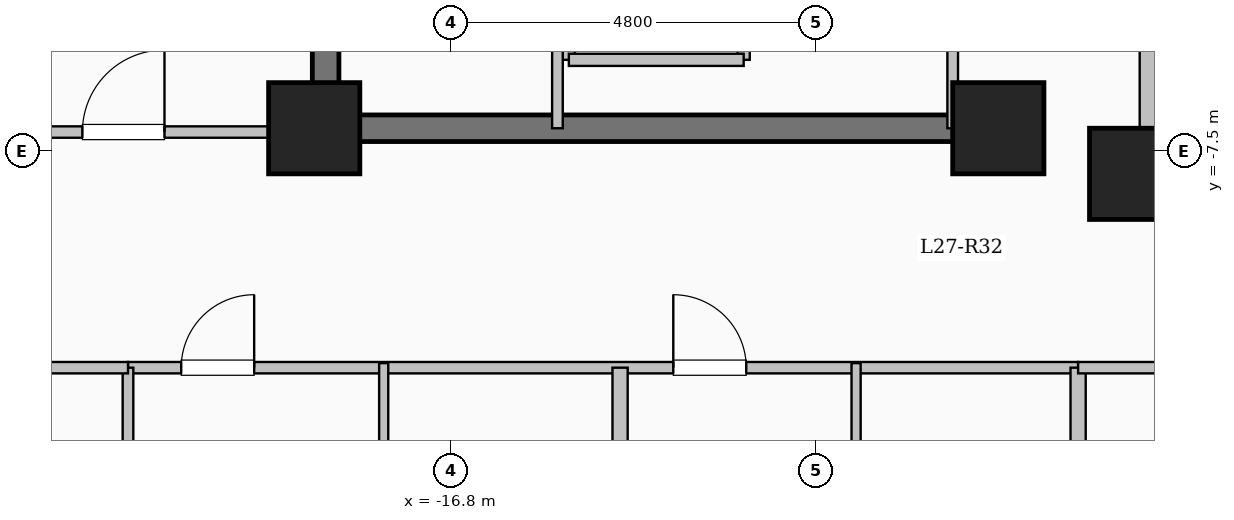
"""IFC4 building model, lengths in metres.
Left out: names, types, materials, properties, quantities, classifications, styles, units other than length and angle.
Written with IfcOpenShell. Run it as: python <this file> out.ifc"""

import sys

from ifc_helpers import new_model, si_unit, direction, frame, frame_2d, origin, origin_2d, place, context, subcontext, project, spatial, rectangle, extrude, element, fill, save


model = new_model("IFC4")
c1 = context("Model", 3, precision=1e-05, world=origin(), true_north=direction((0.0, 1.0)))
c2 = subcontext(c1, "Body", "Model", "MODEL_VIEW")
j1 = project(units=[si_unit("LENGTHUNIT", "METRE"), si_unit("PLANEANGLEUNIT", "RADIAN")], contexts=[c1])
p1 = place(None, origin())
s1 = spatial("IfcSite", under=j1, at=p1, CompositionType="ELEMENT")
p2 = place(p1, origin())
s2 = spatial("IfcBuilding", under=s1, at=p2, CompositionType="ELEMENT")
p3 = place(p2, frame((0.0, 0.0, 101.75)))
s3 = spatial("IfcBuildingStorey", under=s2, at=p3, CompositionType="ELEMENT", Elevation=101.75)
for number, where, z_axis, x_axis in (
    (1, (-7.8, -7.8, 0.0), (0.0, 0.0, 1.0), (1.0, 0.0, 0.0)),
    (2, (-9.6, -7.2, 0.0), (0.0, 0.0, 1.0), (1.0, 0.0, 0.0)),
    (3, (-18.6, -7.2, 0.0), (0.0, 0.0, 1.0), (1.0, 0.0, 0.0)),
):
    element("IfcColumn", number, at=place(p3, frame(where, z_axis=z_axis, x_axis=x_axis)), inside=s3, PredefinedType="COLUMN", context=c2, shape_type="SweptSolid", body=[
        extrude(rectangle(XDim=1.2, YDim=1.2, at=origin_2d()), origin(), (0.0, 0.0, 1.0), 3.35),
    ])
p4 = place(p3, frame((-7.62, -7.62, 0.0), z_axis=(0.0, 0.0, 1.0), x_axis=(1.0, 0.0, 0.0)))
e4 = element("IfcWall", 4, at=p4, inside=s3, PredefinedType="SOLIDWALL", context=c2, shape_type="SweptSolid", body=[
    extrude(rectangle(XDim=15.24, YDim=0.24, at=frame_2d((7.62, 0.0))), origin(), (0.0, 0.0, 1.0), 3.1),
])
p5 = place(p4, frame((6.92, 0.0, 0.95)))
e5 = element("IfcOpeningElement", 5, at=p5, cuts=e4, PredefinedType="OPENING", context=c2, shape_type="SweptSolid", body=[
    extrude(rectangle(XDim=1.4, YDim=1.5, at=frame_2d((0.7, 0.75))), frame((0.0, 0.13, 0.0), z_axis=(0.0, -1.0, 0.0), x_axis=(1.0, 0.0, 0.0)), (0.0, 0.0, 1.0), 0.26),
])
p6 = place(p3, frame((-7.62, 7.62, 0.0), z_axis=(0.0, 0.0, 1.0), x_axis=(0.0, -1.0, 0.0)))
e6 = element("IfcWall", 6, at=p6, inside=s3, PredefinedType="SOLIDWALL", context=c2, shape_type="SweptSolid", body=[
    extrude(rectangle(XDim=15.24, YDim=0.24, at=frame_2d((7.62, 0.0))), origin(), (0.0, 0.0, 1.0), 3.1),
])
p7 = place(p6, frame((6.92, 0.0, 0.95)))
e7 = element("IfcOpeningElement", 7, at=p7, cuts=e6, PredefinedType="OPENING", context=c2, shape_type="SweptSolid", body=[
    extrude(rectangle(XDim=1.4, YDim=1.5, at=frame_2d((0.7, 0.75))), frame((0.0, 0.13, 0.0), z_axis=(0.0, -1.0, 0.0), x_axis=(1.0, 0.0, 0.0)), (0.0, 0.0, 1.0), 0.26),
])
for number, where, z_axis, x_axis in (
    (8, (-15.25, -6.3, 0.0), (0.0, 0.0, 1.0), (0.0, 1.0, 0.0)),
    (9, (-12.95, -6.3, 0.0), (0.0, 0.0, 1.0), (0.0, 1.0, 0.0)),
):
    element("IfcWall", number, at=place(p3, frame(where, z_axis=z_axis, x_axis=x_axis)), inside=s3, PredefinedType="SOLIDWALL", context=c2, shape_type="SweptSolid", body=[
        extrude(rectangle(XDim=2.6, YDim=0.16, at=frame_2d((1.3, 0.0))), origin(), (0.0, 0.0, 1.0), 3.1),
    ])
p8 = place(p3, frame((-15.25, -6.3, 0.0), z_axis=(0.0, 0.0, 1.0), x_axis=(1.0, 0.0, 0.0)))
e10 = element("IfcWall", 10, at=p8, inside=s3, PredefinedType="SOLIDWALL", context=c2, shape_type="SweptSolid", body=[
    extrude(rectangle(XDim=2.3, YDim=0.16, at=frame_2d((1.15, 0.0))), origin(), (0.0, 0.0, 1.0), 3.1),
])
p9 = place(p3, frame((-18.45, -7.375, 0.0), z_axis=(0.0, 0.0, 1.0), x_axis=(0.0, 1.0, 0.0)))
e11 = element("IfcWall", 11, at=p9, inside=s3, PredefinedType="SHEAR", context=c2, shape_type="SweptSolid", body=[
    extrude(rectangle(XDim=14.05, YDim=0.35, at=frame_2d((7.025, 0.0))), origin(), (0.0, 0.0, 1.0), 3.35),
])
p10 = place(p3, frame((-18.625, -7.2, 0.0), z_axis=(0.0, 0.0, 1.0), x_axis=(1.0, 0.0, 0.0)))
e12 = element("IfcWall", 12, at=p10, inside=s3, PredefinedType="SHEAR", context=c2, shape_type="SweptSolid", body=[
    extrude(rectangle(XDim=8.55, YDim=0.35, at=frame_2d((4.275, 0.0))), origin(), (0.0, 0.0, 1.0), 3.35),
])
p11 = place(p3, frame((-15.4, -7.2, 0.0), z_axis=(0.0, 0.0, 1.0), x_axis=(0.0, 1.0, 0.0)))
e13 = element("IfcWall", 13, at=p11, inside=s3, PredefinedType="PARTITIONING", context=c2, shape_type="SweptSolid", body=[
    extrude(rectangle(XDim=10.45, YDim=0.14, at=frame_2d((5.225, 0.0))), origin(), (0.0, 0.0, 1.0), 3.1),
])
p12 = place(p11, frame((9.25, 0.0, 0.0)))
e14 = element("IfcOpeningElement", 14, at=p12, cuts=e13, PredefinedType="OPENING", context=c2, shape_type="SweptSolid", body=[
    extrude(rectangle(XDim=0.9, YDim=2.08, at=frame_2d((0.45, 1.04))), frame((0.0, 0.08, 0.0), z_axis=(0.0, -1.0, 0.0), x_axis=(1.0, 0.0, 0.0)), (0.0, 0.0, 1.0), 0.16),
])
p13 = place(p3, frame((-10.2, -7.2, 0.0), z_axis=(0.0, 0.0, 1.0), x_axis=(0.0, 1.0, 0.0)))
e15 = element("IfcWall", 15, at=p13, inside=s3, PredefinedType="PARTITIONING", context=c2, shape_type="SweptSolid", body=[
    extrude(rectangle(XDim=9.12, YDim=0.14, at=frame_2d((4.56, 0.0))), origin(), (0.0, 0.0, 1.0), 3.1),
])
p14 = place(p13, frame((1.9, 0.0, 0.0)))
e16 = element("IfcOpeningElement", 16, at=p14, cuts=e15, PredefinedType="OPENING", context=c2, shape_type="SweptSolid", body=[
    extrude(rectangle(XDim=0.95, YDim=2.12, at=frame_2d((0.475, 1.06))), frame((0.0, 0.08, 0.0), z_axis=(0.0, -1.0, 0.0), x_axis=(1.0, 0.0, 0.0)), (0.0, 0.0, 1.0), 0.16),
])
p15 = place(p13, frame((7.75, 0.0, 0.0)))
e17 = element("IfcOpeningElement", 17, at=p15, cuts=e15, PredefinedType="OPENING", context=c2, shape_type="SweptSolid", body=[
    extrude(rectangle(XDim=0.95, YDim=2.12, at=frame_2d((0.475, 1.06))), frame((0.0, 0.08, 0.0), z_axis=(0.0, -1.0, 0.0), x_axis=(1.0, 0.0, 0.0)), (0.0, 0.0, 1.0), 0.16),
])
p16 = place(p3, frame((-21.05, -10.35, 0.0), z_axis=(0.0, 0.0, 1.0), x_axis=(1.0, 0.0, 0.0)))
e18 = element("IfcWall", 18, at=p16, inside=s3, PredefinedType="PARTITIONING", context=c2, shape_type="SweptSolid", body=[
    extrude(rectangle(XDim=12.5, YDim=0.15, at=frame_2d((6.25, 0.0))), origin(), (0.0, 0.0, 1.0), 3.1),
])
p17 = place(p16, frame((0.7, 0.0, 0.0)))
e19 = element("IfcOpeningElement", 19, at=p17, cuts=e18, PredefinedType="OPENING", context=c2, shape_type="SweptSolid", body=[
    extrude(rectangle(XDim=0.96, YDim=2.15, at=frame_2d((0.48, 1.075))), frame((0.0, 0.085, 0.0), z_axis=(0.0, -1.0, 0.0), x_axis=(1.0, 0.0, 0.0)), (0.0, 0.0, 1.0), 0.17),
])
p18 = place(p16, frame((7.174, 0.0, 0.0)))
e20 = element("IfcOpeningElement", 20, at=p18, cuts=e18, PredefinedType="OPENING", context=c2, shape_type="SweptSolid", body=[
    extrude(rectangle(XDim=0.96, YDim=2.15, at=frame_2d((0.48, 1.075))), frame((0.0, 0.085, 0.0), z_axis=(0.0, -1.0, 0.0), x_axis=(1.0, 0.0, 0.0)), (0.0, 0.0, 1.0), 0.17),
])
p19 = place(p3, frame((-14.576, -22.1, 0.0), z_axis=(0.0, 0.0, 1.0), x_axis=(0.0, 1.0, 0.0)))
e21 = element("IfcWall", 21, at=p19, inside=s3, PredefinedType="SOLIDWALL", context=c2, shape_type="SweptSolid", body=[
    extrude(rectangle(XDim=11.75, YDim=0.2, at=frame_2d((5.875, 0.0))), origin(), (0.0, 0.0, 1.0), 3.1),
])
p20 = place(p3, frame((-17.686, -13.51, 0.0), z_axis=(0.0, 0.0, 1.0), x_axis=(0.0, 1.0, 0.0)))
e22 = element("IfcWall", 22, at=p20, inside=s3, PredefinedType="PARTITIONING", context=c2, shape_type="SweptSolid", body=[
    extrude(rectangle(XDim=3.22, YDim=0.12, at=frame_2d((1.61, 0.0))), origin(), (0.0, 0.0, 1.0), 3.1),
])
p21 = place(p20, frame((1.14, 0.0, 0.0)))
e23 = element("IfcOpeningElement", 23, at=p21, cuts=e22, PredefinedType="OPENING", context=c2, shape_type="SweptSolid", body=[
    extrude(rectangle(XDim=0.88, YDim=2.1, at=frame_2d((0.44, 1.05))), frame((0.0, 0.07, 0.0), z_axis=(0.0, -1.0, 0.0), x_axis=(1.0, 0.0, 0.0)), (0.0, 0.0, 1.0), 0.14),
])
p22 = place(p3, frame((-11.471, -13.51, 0.0), z_axis=(0.0, 0.0, 1.0), x_axis=(0.0, 1.0, 0.0)))
e24 = element("IfcWall", 24, at=p22, inside=s3, PredefinedType="PARTITIONING", context=c2, shape_type="SweptSolid", body=[
    extrude(rectangle(XDim=3.22, YDim=0.12, at=frame_2d((1.61, 0.0))), origin(), (0.0, 0.0, 1.0), 3.1),
])
p23 = place(p22, frame((1.14, 0.0, 0.0)))
e25 = element("IfcOpeningElement", 25, at=p23, cuts=e24, PredefinedType="OPENING", context=c2, shape_type="SweptSolid", body=[
    extrude(rectangle(XDim=0.88, YDim=2.1, at=frame_2d((0.44, 1.05))), frame((0.0, 0.07, 0.0), z_axis=(0.0, -1.0, 0.0), x_axis=(1.0, 0.0, 0.0)), (0.0, 0.0, 1.0), 0.14),
])
p24 = place(p3, frame((-8.55, -22.704, 0.0), z_axis=(0.0, 0.0, 1.0), x_axis=(0.0, 1.0, 0.0)))
e26 = element("IfcWall", 26, at=p24, inside=s3, PredefinedType="SOLIDWALL", context=c2, shape_type="SweptSolid", body=[
    extrude(rectangle(XDim=12.354, YDim=0.2, at=frame_2d((6.177, 0.0))), origin(), (0.0, 0.0, 1.0), 3.1),
])
p25 = place(p3, frame((-8.55, -10.35, 0.0), z_axis=(0.0, 0.0, 1.0), x_axis=(1.0, 0.0, 0.0)))
e27 = element("IfcWall", 27, at=p25, inside=s3, PredefinedType="PARTITIONING", context=c2, shape_type="SweptSolid", body=[
    extrude(rectangle(XDim=17.1, YDim=0.15, at=frame_2d((8.55, 0.0))), origin(), (0.0, 0.0, 1.0), 3.1),
])
p26 = place(p25, frame((1.6, 0.0, 0.0)))
e28 = element("IfcOpeningElement", 28, at=p26, cuts=e27, PredefinedType="OPENING", context=c2, shape_type="SweptSolid", body=[
    extrude(rectangle(XDim=0.95, YDim=2.15, at=frame_2d((0.475, 1.075))), frame((0.0, 0.085, 0.0), z_axis=(0.0, -1.0, 0.0), x_axis=(1.0, 0.0, 0.0)), (0.0, 0.0, 1.0), 0.17),
])
p27 = place(p25, frame((10.5, 0.0, 0.0)))
e29 = element("IfcOpeningElement", 29, at=p27, cuts=e27, PredefinedType="OPENING", context=c2, shape_type="SweptSolid", body=[
    extrude(rectangle(XDim=0.95, YDim=2.15, at=frame_2d((0.475, 1.075))), frame((0.0, 0.085, 0.0), z_axis=(0.0, -1.0, 0.0), x_axis=(1.0, 0.0, 0.0)), (0.0, 0.0, 1.0), 0.17),
])
p28 = place(p3, frame((-26.88, -7.25, 0.0), z_axis=(0.0, 0.0, 1.0), x_axis=(1.0, 0.0, 0.0)))
e30 = element("IfcWall", 30, at=p28, inside=s3, PredefinedType="PARTITIONING", context=c2, shape_type="SweptSolid", body=[
    extrude(rectangle(XDim=8.43, YDim=0.15, at=frame_2d((4.215, 0.0))), origin(), (0.0, 0.0, 1.0), 3.1),
])
p29 = place(p28, frame((5.23, 0.0, 0.0)))
e31 = element("IfcOpeningElement", 31, at=p29, cuts=e30, PredefinedType="OPENING", context=c2, shape_type="SweptSolid", body=[
    extrude(rectangle(XDim=1.08, YDim=2.15, at=frame_2d((0.54, 1.075))), frame((0.0, 0.085, 0.0), z_axis=(0.0, -1.0, 0.0), x_axis=(1.0, 0.0, 0.0)), (0.0, 0.0, 1.0), 0.17),
])
p30 = place(p3, frame((-21.05, -17.85, 0.0), z_axis=(0.0, 0.0, 1.0), x_axis=(0.0, 1.0, 0.0)))
e32 = element("IfcWall", 32, at=p30, inside=s3, PredefinedType="PARTITIONING", context=c2, shape_type="SweptSolid", body=[
    extrude(rectangle(XDim=7.5, YDim=0.14, at=frame_2d((3.75, 0.0))), origin(), (0.0, 0.0, 1.0), 3.1),
])
p31 = place(p3, frame((-26.88, -10.35, 0.0), z_axis=(0.0, 0.0, 1.0), x_axis=(1.0, 0.0, 0.0)))
e33 = element("IfcWall", 33, at=p31, inside=s3, PredefinedType="PARTITIONING", context=c2, shape_type="SweptSolid", body=[
    extrude(rectangle(XDim=5.83, YDim=0.15, at=frame_2d((2.915, 0.0))), origin(), (0.0, 0.0, 1.0), 3.1),
])
p32 = place(p31, frame((2.44, 0.0, 0.0)))
e34 = element("IfcOpeningElement", 34, at=p32, cuts=e33, PredefinedType="OPENING", context=c2, shape_type="SweptSolid", body=[
    extrude(rectangle(XDim=0.95, YDim=2.15, at=frame_2d((0.475, 1.075))), frame((0.0, 0.085, 0.0), z_axis=(0.0, -1.0, 0.0), x_axis=(1.0, 0.0, 0.0)), (0.0, 0.0, 1.0), 0.17),
])
p33 = place(p17, origin())
e35 = element("IfcDoor", 35, at=p33, inside=s3, OperationType="SINGLE_SWING_RIGHT", PredefinedType="DOOR", context=c2, shape_type="SweptSolid", body=[
    extrude(rectangle(XDim=0.96, YDim=2.15, at=frame_2d((0.48, 1.075))), frame((0.0, 0.025, 0.0), z_axis=(0.0, -1.0, 0.0), x_axis=(1.0, 0.0, 0.0)), (0.0, 0.0, 1.0), 0.05),
])
fill(e19, e35)
p34 = place(p18, origin())
e36 = element("IfcDoor", 36, at=p34, inside=s3, OperationType="SINGLE_SWING_LEFT", PredefinedType="DOOR", context=c2, shape_type="SweptSolid", body=[
    extrude(rectangle(XDim=0.96, YDim=2.15, at=frame_2d((0.48, 1.075))), frame((0.0, 0.025, 0.0), z_axis=(0.0, -1.0, 0.0), x_axis=(1.0, 0.0, 0.0)), (0.0, 0.0, 1.0), 0.05),
])
fill(e20, e36)
p35 = place(p29, origin())
e37 = element("IfcDoor", 37, at=p35, inside=s3, OperationType="SINGLE_SWING_RIGHT", PredefinedType="DOOR", context=c2, shape_type="SweptSolid", body=[
    extrude(rectangle(XDim=1.08, YDim=2.15, at=frame_2d((0.54, 1.075))), frame((0.0, 0.025, 0.0), z_axis=(0.0, -1.0, 0.0), x_axis=(1.0, 0.0, 0.0)), (0.0, 0.0, 1.0), 0.05),
])
fill(e31, e37)
save(model, sys.argv[1])
